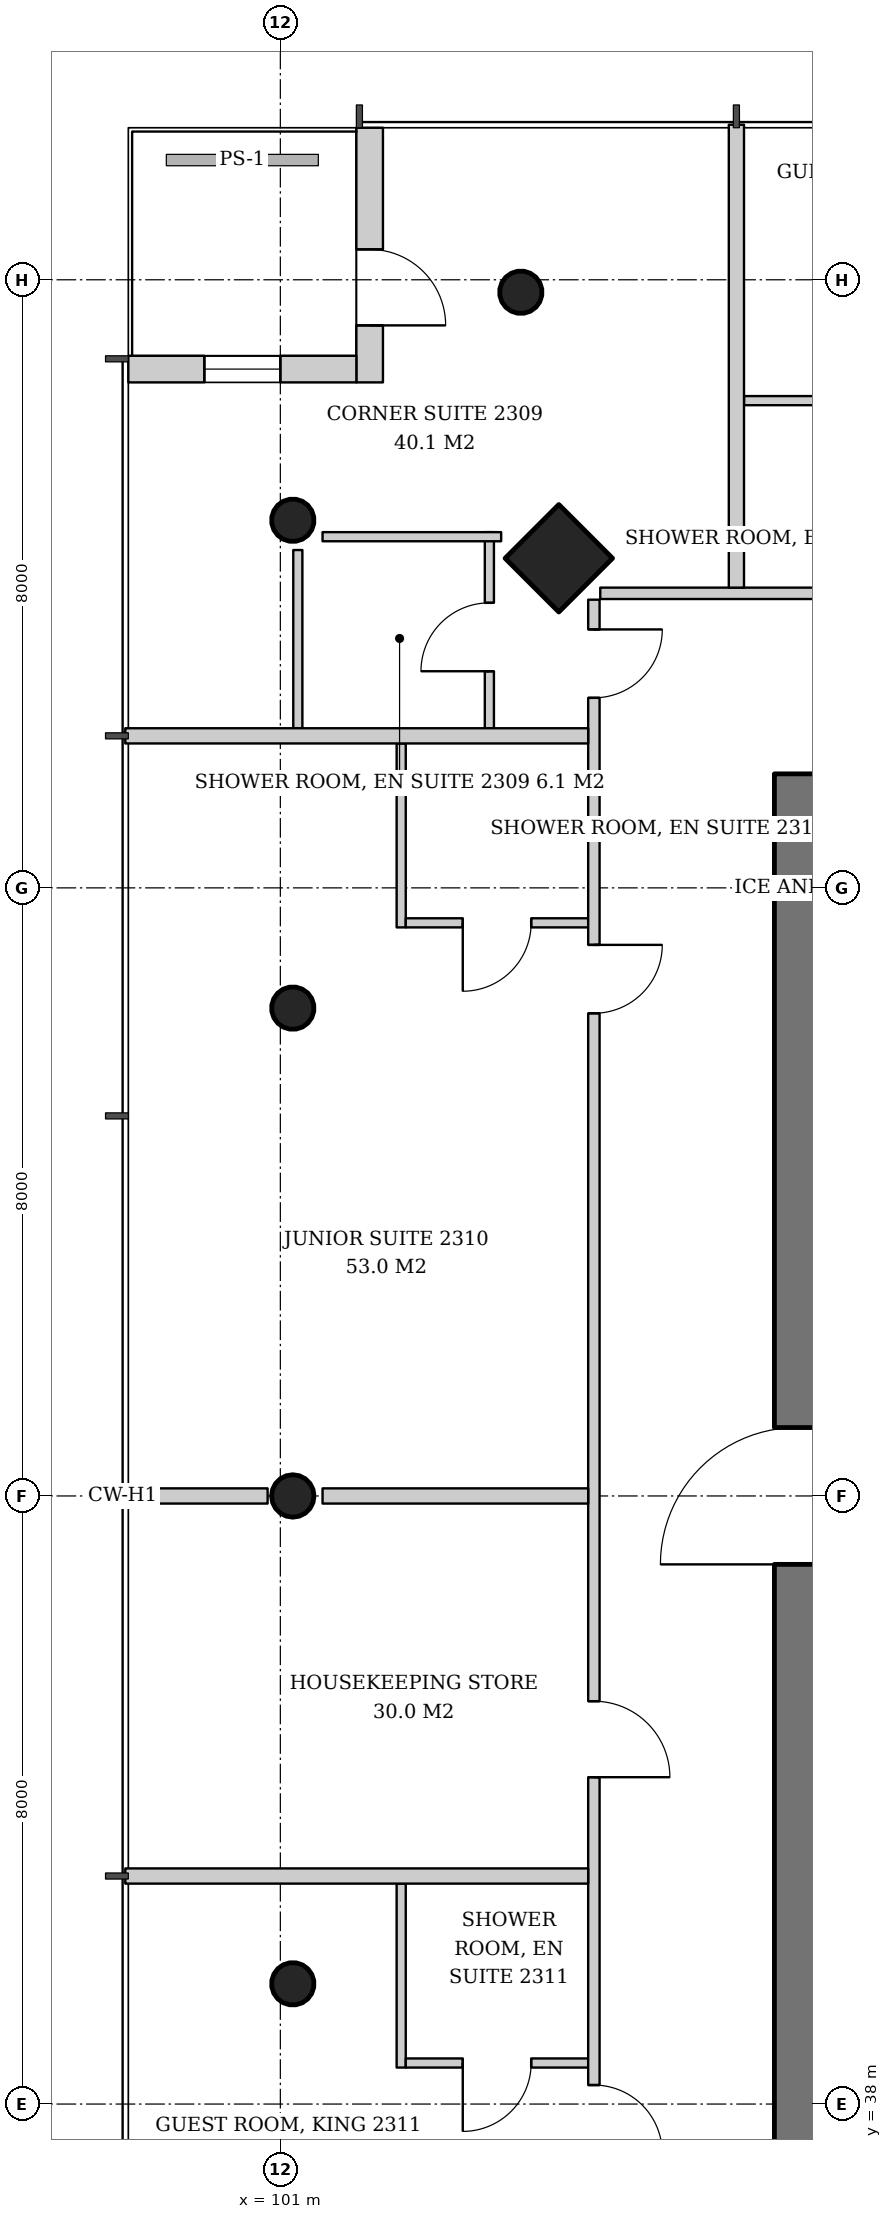
"""IFC4 building model, lengths in metres.
Left out: names, types, materials, properties, quantities, classifications, styles, units other than length and angle.
Written with IfcOpenShell. Run it as: python <this file> out.ifc"""

import sys

from ifc_helpers import new_model, si_unit, direction, frame, frame_2d, origin, origin_2d, place, context, subcontext, project, spatial, rectangle, hollow_circle, extrude, element, fill, save


model = new_model("IFC4")
c1 = context("Model", 3, precision=1e-05, world=origin(), true_north=direction((0.0, 1.0)))
c2 = subcontext(c1, "Body", "Model", "MODEL_VIEW")
j1 = project(units=[si_unit("LENGTHUNIT", "METRE"), si_unit("PLANEANGLEUNIT", "RADIAN")], contexts=[c1])
p1 = place(None, origin())
s1 = spatial("IfcSite", under=j1, at=p1, CompositionType="ELEMENT")
p2 = place(p1, origin())
s2 = spatial("IfcBuilding", under=s1, at=p2, CompositionType="ELEMENT")
p3 = place(p2, frame((0.0, 0.0, 93.2)))
s3 = spatial("IfcBuildingStorey", under=s2, at=p3, CompositionType="ELEMENT", Elevation=93.2)
p4 = place(p3, frame((104.612, 58.388, 0.0), z_axis=(0.043029647111, -0.043029647111, 0.998146732169), x_axis=(0.707106781187, 0.707106781187, 0.0)))
e1 = element("IfcColumn", 1, at=p4, inside=s3, PredefinedType="COLUMN", context=c2, shape_type="SweptSolid", body=[
    extrude(rectangle(XDim=1.0, YDim=1.0, at=origin_2d()), origin(), (0.0, 0.0, 1.0), 3.807),
])
for number, where, z_axis, x_axis in (
    (2, (104.112, 61.888, 0.0), (0.043, -0.043, 0.998), (0.707, 0.707, 0.0)),
    (3, (101.112, 58.888, 0.0), (0.043, -0.043, 0.998), (0.707, 0.707, 0.0)),
):
    element("IfcColumn", number, at=place(p3, frame(where, z_axis=z_axis, x_axis=x_axis)), inside=s3, PredefinedType="COLUMN", context=c2, shape_type="SweptSolid", body=[
        extrude(hollow_circle(Radius=0.28, WallThickness=0.02, at=origin_2d()), origin(), (0.0, 0.0, 1.0), 3.807),
    ])
p5 = place(p3, frame((101.112, 52.444, 0.0), z_axis=(0.043059584825, -0.021497706284, 0.998841188968), x_axis=(0.446680166538, 0.894693706707, 0.0)))
e4 = element("IfcColumn", 4, at=p5, inside=s3, PredefinedType="COLUMN", context=c2, shape_type="SweptSolid", body=[
    extrude(hollow_circle(Radius=0.28, WallThickness=0.02, at=origin_2d()), origin(), (0.0, 0.0, 1.0), 3.804),
])
p6 = place(p3, frame((101.112, 46.0, 0.0), z_axis=(0.043069538298, 0.0, 0.999072076915), x_axis=(0.0, 1.0, 0.0)))
e5 = element("IfcColumn", 5, at=p6, inside=s3, PredefinedType="COLUMN", context=c2, shape_type="SweptSolid", body=[
    extrude(hollow_circle(Radius=0.28, WallThickness=0.02, at=origin_2d()), origin(), (0.0, 0.0, 1.0), 3.803),
])
p7 = place(p3, frame((101.112, 39.556, 0.0), z_axis=(0.043059584825, 0.021497706284, 0.998841188968), x_axis=(-0.446680166538, 0.894693706707, 0.0)))
e6 = element("IfcColumn", 6, at=p7, inside=s3, PredefinedType="COLUMN", context=c2, shape_type="SweptSolid", body=[
    extrude(hollow_circle(Radius=0.28, WallThickness=0.02, at=origin_2d()), origin(), (0.0, 0.0, 1.0), 3.804),
])
p8 = place(p3, frame((107.5, 55.2, 0.0), z_axis=(0.0, 0.0, 1.0), x_axis=(1.0, 0.0, 0.0)))
e7 = element("IfcWall", 7, at=p8, inside=s3, PredefinedType="SHEAR", context=c2, shape_type="SweptSolid", body=[
    extrude(rectangle(XDim=19.0, YDim=0.6, at=frame_2d((9.5, 0.0))), origin(), (0.0, 0.0, 1.0), 3.8),
])
p9 = place(p8, frame((14.14, 0.0, 0.0)))
e8 = element("IfcOpeningElement", 8, at=p9, cuts=e7, PredefinedType="OPENING", context=c2, shape_type="SweptSolid", body=[
    extrude(rectangle(XDim=1.0, YDim=2.1, at=frame_2d((0.5, 1.05))), frame((0.0, 0.31, 0.0), z_axis=(0.0, -1.0, 0.0), x_axis=(1.0, 0.0, 0.0)), (0.0, 0.0, 1.0), 0.62),
])
p10 = place(p8, frame((1.675, 0.0, 0.0)))
e9 = element("IfcOpeningElement", 9, at=p10, cuts=e7, PredefinedType="OPENING", context=c2, shape_type="SweptSolid", body=[
    extrude(rectangle(XDim=1.0, YDim=2.1, at=frame_2d((0.5, 1.05))), frame((0.0, 0.31, 0.0), z_axis=(0.0, -1.0, 0.0), x_axis=(1.0, 0.0, 0.0)), (0.0, 0.0, 1.0), 0.62),
])
p11 = place(p8, frame((3.587, 0.0, 0.0)))
e10 = element("IfcOpeningElement", 10, at=p11, cuts=e7, PredefinedType="OPENING", context=c2, shape_type="SweptSolid", body=[
    extrude(rectangle(XDim=1.0, YDim=2.1, at=frame_2d((0.5, 1.05))), frame((0.0, 0.31, 0.0), z_axis=(0.0, -1.0, 0.0), x_axis=(1.0, 0.0, 0.0)), (0.0, 0.0, 1.0), 0.62),
])
p12 = place(p3, frame((107.8, 37.1, 0.0), z_axis=(0.0, 0.0, 1.0), x_axis=(0.0, 1.0, 0.0)))
e11 = element("IfcWall", 11, at=p12, inside=s3, PredefinedType="SHEAR", context=c2, shape_type="SweptSolid", body=[
    extrude(rectangle(XDim=17.8, YDim=0.6, at=frame_2d((8.9, 0.0))), origin(), (0.0, 0.0, 1.0), 3.8),
])
p13 = place(p12, frame((8.0, 0.0, 0.0)))
e12 = element("IfcOpeningElement", 12, at=p13, cuts=e11, PredefinedType="OPENING", context=c2, shape_type="SweptSolid", body=[
    extrude(rectangle(XDim=1.8, YDim=2.4, at=frame_2d((0.9, 1.2))), frame((0.0, 0.31, 0.0), z_axis=(0.0, -1.0, 0.0), x_axis=(1.0, 0.0, 0.0)), (0.0, 0.0, 1.0), 0.62),
])
p14 = place(p3, frame((102.175, 64.0, 0.0), z_axis=(0.0, 0.0, 1.0), x_axis=(0.0, -1.0, 0.0)))
e13 = element("IfcWall", 13, at=p14, inside=s3, PredefinedType="SOLIDWALL", context=c2, shape_type="SweptSolid", body=[
    extrude(rectangle(XDim=3.35, YDim=0.35, at=frame_2d((1.675, 0.0))), origin(), (0.0, 0.0, 1.0), 3.6),
])
p15 = place(p14, frame((1.6, 0.0, 0.0)))
e14 = element("IfcOpeningElement", 14, at=p15, cuts=e13, PredefinedType="OPENING", context=c2, shape_type="SweptSolid", body=[
    extrude(rectangle(XDim=1.0, YDim=2.4, at=frame_2d((0.5, 1.2))), frame((0.0, 0.185, 0.0), z_axis=(0.0, -1.0, 0.0), x_axis=(1.0, 0.0, 0.0)), (0.0, 0.0, 1.0), 0.37),
])
p16 = place(p3, frame((102.0, 60.825, 0.0), z_axis=(0.0, 0.0, 1.0), x_axis=(-1.0, 0.0, 0.0)))
e15 = element("IfcWall", 15, at=p16, inside=s3, PredefinedType="SOLIDWALL", context=c2, shape_type="SweptSolid", body=[
    extrude(rectangle(XDim=3.0, YDim=0.35, at=frame_2d((1.5, 0.0))), origin(), (0.0, 0.0, 1.0), 3.6),
])
p17 = place(p16, frame((1.0, 0.0, 0.9)))
e16 = element("IfcOpeningElement", 16, at=p17, cuts=e15, PredefinedType="OPENING", context=c2, shape_type="SweptSolid", body=[
    extrude(rectangle(XDim=1.0, YDim=2.4, at=frame_2d((0.5, 1.2))), frame((0.0, 0.185, 0.0), z_axis=(0.0, -1.0, 0.0), x_axis=(1.0, 0.0, 0.0)), (0.0, 0.0, 1.0), 0.37),
])
p18 = place(p3, frame((109.52, 60.41, 0.0), z_axis=(0.0, 0.0, 1.0), x_axis=(-1.0, 0.0, 0.0)))
e17 = element("IfcWall", 17, at=p18, inside=s3, PredefinedType="PARTITIONING", context=c2, shape_type="SweptSolid", body=[
    extrude(rectangle(XDim=2.42, YDim=0.12, at=frame_2d((1.21, 0.0))), origin(), (0.0, 0.0, 1.0), 3.0),
])
p19 = place(p3, frame((128.791, 57.875, 0.0), z_axis=(0.0, 0.0, 1.0), x_axis=(-1.0, 0.0, 0.0)))
e18 = element("IfcWall", 18, at=p19, inside=s3, PredefinedType="PARTITIONING", context=c2, shape_type="SweptSolid", body=[
    extrude(rectangle(XDim=23.583, YDim=0.15, at=frame_2d((11.791, 0.0))), origin(), (0.0, 0.0, 1.0), 2.9),
])
p20 = place(p19, frame((0.391, 0.0, 0.0)))
e19 = element("IfcOpeningElement", 19, at=p20, cuts=e18, PredefinedType="OPENING", context=c2, shape_type="SweptSolid", body=[
    extrude(rectangle(XDim=0.9, YDim=2.1, at=frame_2d((0.45, 1.05))), frame((0.0, 0.085, 0.0), z_axis=(0.0, -1.0, 0.0), x_axis=(1.0, 0.0, 0.0)), (0.0, 0.0, 1.0), 0.17),
])
p21 = place(p19, frame((8.141, 0.0, 0.0)))
e20 = element("IfcOpeningElement", 20, at=p21, cuts=e18, PredefinedType="OPENING", context=c2, shape_type="SweptSolid", body=[
    extrude(rectangle(XDim=0.9, YDim=2.1, at=frame_2d((0.45, 1.05))), frame((0.0, 0.085, 0.0), z_axis=(0.0, -1.0, 0.0), x_axis=(1.0, 0.0, 0.0)), (0.0, 0.0, 1.0), 0.17),
])
p22 = place(p19, frame((14.541, 0.0, 0.0)))
e21 = element("IfcOpeningElement", 21, at=p22, cuts=e18, PredefinedType="OPENING", context=c2, shape_type="SweptSolid", body=[
    extrude(rectangle(XDim=0.9, YDim=2.1, at=frame_2d((0.45, 1.05))), frame((0.0, 0.085, 0.0), z_axis=(0.0, -1.0, 0.0), x_axis=(1.0, 0.0, 0.0)), (0.0, 0.0, 1.0), 0.17),
])
p23 = place(p19, frame((18.141, 0.0, 0.0)))
e22 = element("IfcOpeningElement", 22, at=p23, cuts=e18, PredefinedType="OPENING", context=c2, shape_type="SweptSolid", body=[
    extrude(rectangle(XDim=0.9, YDim=2.1, at=frame_2d((0.45, 1.05))), frame((0.0, 0.085, 0.0), z_axis=(0.0, -1.0, 0.0), x_axis=(1.0, 0.0, 0.0)), (0.0, 0.0, 1.0), 0.17),
])
p24 = place(p3, frame((107.0, 57.95, 0.0), z_axis=(0.0, 0.0, 1.0), x_axis=(0.0, 1.0, 0.0)))
e23 = element("IfcWall", 23, at=p24, inside=s3, PredefinedType="PARTITIONING", context=c2, shape_type="SweptSolid", body=[
    extrude(rectangle(XDim=6.09, YDim=0.2, at=frame_2d((3.045, 0.0))), origin(), (0.0, 0.0, 1.0), 3.2),
])
p25 = place(p3, frame((103.75, 56.1, 0.0), z_axis=(0.0, 0.0, 1.0), x_axis=(0.0, 1.0, 0.0)))
e24 = element("IfcWall", 24, at=p25, inside=s3, PredefinedType="PARTITIONING", context=c2, shape_type="SweptSolid", body=[
    extrude(rectangle(XDim=2.58, YDim=0.12, at=frame_2d((1.29, 0.0))), origin(), (0.0, 0.0, 1.0), 3.2),
])
p26 = place(p25, frame((0.75, 0.0, 0.0)))
e25 = element("IfcOpeningElement", 25, at=p26, cuts=e24, PredefinedType="OPENING", context=c2, shape_type="SweptSolid", body=[
    extrude(rectangle(XDim=0.9, YDim=2.1, at=frame_2d((0.45, 1.05))), frame((0.0, 0.07, 0.0), z_axis=(0.0, -1.0, 0.0), x_axis=(1.0, 0.0, 0.0)), (0.0, 0.0, 1.0), 0.14),
])
p27 = place(p3, frame((101.23, 56.1, 0.0), z_axis=(0.0, 0.0, 1.0), x_axis=(0.0, 1.0, 0.0)))
e26 = element("IfcWall", 26, at=p27, inside=s3, PredefinedType="PARTITIONING", context=c2, shape_type="SweptSolid", body=[
    extrude(rectangle(XDim=2.344, YDim=0.12, at=frame_2d((1.172, 0.0))), origin(), (0.0, 0.0, 1.0), 3.2),
])
p28 = place(p3, frame((103.905, 58.62, 0.0), z_axis=(0.0, 0.0, 1.0), x_axis=(-1.0, 0.0, 0.0)))
e27 = element("IfcWall", 27, at=p28, inside=s3, PredefinedType="PARTITIONING", context=c2, shape_type="SweptSolid", body=[
    extrude(rectangle(XDim=2.35, YDim=0.12, at=frame_2d((1.175, 0.0))), origin(), (0.0, 0.0, 1.0), 3.2),
])
p29 = place(p3, frame((102.59, 55.9, 0.0), z_axis=(0.0, 0.0, 1.0), x_axis=(0.0, -1.0, 0.0)))
e28 = element("IfcWall", 28, at=p29, inside=s3, PredefinedType="PARTITIONING", context=c2, shape_type="SweptSolid", body=[
    extrude(rectangle(XDim=2.42, YDim=0.12, at=frame_2d((1.21, 0.0))), origin(), (0.0, 0.0, 1.0), 2.9),
])
p30 = place(p3, frame((105.05, 53.54, 0.0), z_axis=(0.0, 0.0, 1.0), x_axis=(-1.0, 0.0, 0.0)))
e29 = element("IfcWall", 29, at=p30, inside=s3, PredefinedType="PARTITIONING", context=c2, shape_type="SweptSolid", body=[
    extrude(rectangle(XDim=2.4, YDim=0.12, at=frame_2d((1.2, 0.0))), origin(), (0.0, 0.0, 1.0), 3.6),
])
p31 = place(p30, frame((0.75, 0.0, 0.0)))
e30 = element("IfcOpeningElement", 30, at=p31, cuts=e29, PredefinedType="OPENING", context=c2, shape_type="SweptSolid", body=[
    extrude(rectangle(XDim=0.9, YDim=2.1, at=frame_2d((0.45, 1.05))), frame((0.0, 0.07, 0.0), z_axis=(0.0, -1.0, 0.0), x_axis=(1.0, 0.0, 0.0)), (0.0, 0.0, 1.0), 0.14),
])
p32 = place(p3, frame((102.59, 40.9, 0.0), z_axis=(0.0, 0.0, 1.0), x_axis=(0.0, -1.0, 0.0)))
e31 = element("IfcWall", 31, at=p32, inside=s3, PredefinedType="PARTITIONING", context=c2, shape_type="SweptSolid", body=[
    extrude(rectangle(XDim=2.42, YDim=0.12, at=frame_2d((1.21, 0.0))), origin(), (0.0, 0.0, 1.0), 3.0),
])
p33 = place(p3, frame((105.05, 38.54, 0.0), z_axis=(0.0, 0.0, 1.0), x_axis=(-1.0, 0.0, 0.0)))
e32 = element("IfcWall", 32, at=p33, inside=s3, PredefinedType="PARTITIONING", context=c2, shape_type="SweptSolid", body=[
    extrude(rectangle(XDim=2.4, YDim=0.12, at=frame_2d((1.2, 0.0))), origin(), (0.0, 0.0, 1.0), 3.0),
])
p34 = place(p33, frame((0.75, 0.0, 0.0)))
e33 = element("IfcOpeningElement", 33, at=p34, cuts=e32, PredefinedType="OPENING", context=c2, shape_type="SweptSolid", body=[
    extrude(rectangle(XDim=0.9, YDim=2.1, at=frame_2d((0.45, 1.05))), frame((0.0, 0.07, 0.0), z_axis=(0.0, -1.0, 0.0), x_axis=(1.0, 0.0, 0.0)), (0.0, 0.0, 1.0), 0.14),
])
p35 = place(p3, frame((105.125, 57.791, 0.0), z_axis=(0.0, 0.0, 1.0), x_axis=(0.0, -1.0, 0.0)))
e34 = element("IfcWall", 34, at=p35, inside=s3, PredefinedType="PARTITIONING", context=c2, shape_type="SweptSolid", body=[
    extrude(rectangle(XDim=23.583, YDim=0.15, at=frame_2d((11.791, 0.0))), origin(), (0.0, 0.0, 1.0), 2.9),
])
p36 = place(p35, frame((0.391, 0.0, 0.0)))
e35 = element("IfcOpeningElement", 35, at=p36, cuts=e34, PredefinedType="OPENING", context=c2, shape_type="SweptSolid", body=[
    extrude(rectangle(XDim=0.9, YDim=2.1, at=frame_2d((0.45, 1.05))), frame((0.0, 0.085, 0.0), z_axis=(0.0, -1.0, 0.0), x_axis=(1.0, 0.0, 0.0)), (0.0, 0.0, 1.0), 0.17),
])
p37 = place(p35, frame((4.541, 0.0, 0.0)))
e36 = element("IfcOpeningElement", 36, at=p37, cuts=e34, PredefinedType="OPENING", context=c2, shape_type="SweptSolid", body=[
    extrude(rectangle(XDim=0.9, YDim=2.1, at=frame_2d((0.45, 1.05))), frame((0.0, 0.085, 0.0), z_axis=(0.0, -1.0, 0.0), x_axis=(1.0, 0.0, 0.0)), (0.0, 0.0, 1.0), 0.17),
])
p38 = place(p35, frame((14.491, 0.0, 0.0)))
e37 = element("IfcOpeningElement", 37, at=p38, cuts=e34, PredefinedType="OPENING", context=c2, shape_type="SweptSolid", body=[
    extrude(rectangle(XDim=1.0, YDim=2.1, at=frame_2d((0.5, 1.05))), frame((0.0, 0.085, 0.0), z_axis=(0.0, -1.0, 0.0), x_axis=(1.0, 0.0, 0.0)), (0.0, 0.0, 1.0), 0.17),
])
p39 = place(p35, frame((19.541, 0.0, 0.0)))
e38 = element("IfcOpeningElement", 38, at=p39, cuts=e34, PredefinedType="OPENING", context=c2, shape_type="SweptSolid", body=[
    extrude(rectangle(XDim=0.9, YDim=2.1, at=frame_2d((0.45, 1.05))), frame((0.0, 0.085, 0.0), z_axis=(0.0, -1.0, 0.0), x_axis=(1.0, 0.0, 0.0)), (0.0, 0.0, 1.0), 0.17),
])
p40 = place(p3, frame((105.05, 56.0, 0.0), z_axis=(0.0, 0.0, 1.0), x_axis=(-1.0, 0.0, 0.0)))
e39 = element("IfcWall", 39, at=p40, inside=s3, PredefinedType="PARTITIONING", context=c2, shape_type="SweptSolid", body=[
    extrude(rectangle(XDim=6.09, YDim=0.2, at=frame_2d((3.045, 0.0))), origin(), (0.0, 0.0, 1.0), 3.2),
])
p41 = place(p3, frame((105.05, 46.0, 0.0), z_axis=(0.0, 0.0, 1.0), x_axis=(-1.0, 0.0, 0.0)))
e40 = element("IfcWall", 40, at=p41, inside=s3, PredefinedType="PARTITIONING", context=c2, shape_type="SweptSolid", body=[
    extrude(rectangle(XDim=3.495, YDim=0.2, at=frame_2d((1.747, 0.0))), origin(), (0.0, 0.0, 1.0), 3.6),
])
p42 = place(p3, frame((100.833, 46.0, 0.0), z_axis=(0.0, 0.0, 1.0), x_axis=(-1.0, 0.0, 0.0)))
e41 = element("IfcWall", 41, at=p42, inside=s3, PredefinedType="PARTITIONING", context=c2, shape_type="SweptSolid", body=[
    extrude(rectangle(XDim=1.873, YDim=0.2, at=frame_2d((0.936, 0.0))), origin(), (0.0, 0.0, 1.0), 3.6),
])
p43 = place(p3, frame((105.05, 41.0, 0.0), z_axis=(0.0, 0.0, 1.0), x_axis=(-1.0, 0.0, 0.0)))
e42 = element("IfcWall", 42, at=p43, inside=s3, PredefinedType="PARTITIONING", context=c2, shape_type="SweptSolid", body=[
    extrude(rectangle(XDim=6.09, YDim=0.2, at=frame_2d((3.045, 0.0))), origin(), (0.0, 0.0, 1.0), 3.2),
])
p44 = place(p15, origin())
e43 = element("IfcDoor", 43, at=p44, inside=s3, OperationType="SINGLE_SWING_RIGHT", PredefinedType="DOOR", context=c2, shape_type="SweptSolid", body=[
    extrude(rectangle(XDim=1.0, YDim=2.4, at=frame_2d((0.5, 1.2))), frame((0.0, 0.025, 0.0), z_axis=(0.0, -1.0, 0.0), x_axis=(1.0, 0.0, 0.0)), (0.0, 0.0, 1.0), 0.05),
])
fill(e14, e43)
p45 = place(p17, origin())
e44 = element("IfcWindow", 44, at=p45, inside=s3, PartitioningType="SINGLE_PANEL", PredefinedType="WINDOW", context=c2, shape_type="SweptSolid", body=[
    extrude(rectangle(XDim=1.0, YDim=2.4, at=frame_2d((0.5, 1.2))), frame((0.0, 0.03, 0.0), z_axis=(0.0, -1.0, 0.0), x_axis=(1.0, 0.0, 0.0)), (0.0, 0.0, 1.0), 0.06),
])
fill(e16, e44)
p46 = place(p13, origin())
e45 = element("IfcDoor", 45, at=p46, inside=s3, OperationType="DOUBLE_DOOR_SINGLE_SWING", PredefinedType="DOOR", context=c2, shape_type="SweptSolid", body=[
    extrude(rectangle(XDim=1.8, YDim=2.4, at=frame_2d((0.9, 1.2))), frame((0.0, 0.025, 0.0), z_axis=(0.0, -1.0, 0.0), x_axis=(1.0, 0.0, 0.0)), (0.0, 0.0, 1.0), 0.05),
])
fill(e12, e45)
p47 = place(p26, origin())
e46 = element("IfcDoor", 46, at=p47, inside=s3, OperationType="SINGLE_SWING_LEFT", PredefinedType="DOOR", context=c2, shape_type="SweptSolid", body=[
    extrude(rectangle(XDim=0.9, YDim=2.1, at=frame_2d((0.45, 1.05))), frame((0.0, 0.025, 0.0), z_axis=(0.0, -1.0, 0.0), x_axis=(1.0, 0.0, 0.0)), (0.0, 0.0, 1.0), 0.05),
])
fill(e25, e46)
p48 = place(p31, origin())
e47 = element("IfcDoor", 47, at=p48, inside=s3, OperationType="SINGLE_SWING_RIGHT", PredefinedType="DOOR", context=c2, shape_type="SweptSolid", body=[
    extrude(rectangle(XDim=0.9, YDim=2.1, at=frame_2d((0.45, 1.05))), frame((0.0, 0.025, 0.0), z_axis=(0.0, -1.0, 0.0), x_axis=(1.0, 0.0, 0.0)), (0.0, 0.0, 1.0), 0.05),
])
fill(e30, e47)
p49 = place(p34, origin())
e48 = element("IfcDoor", 48, at=p49, inside=s3, OperationType="SINGLE_SWING_RIGHT", PredefinedType="DOOR", context=c2, shape_type="SweptSolid", body=[
    extrude(rectangle(XDim=0.9, YDim=2.1, at=frame_2d((0.45, 1.05))), frame((0.0, 0.025, 0.0), z_axis=(0.0, -1.0, 0.0), x_axis=(1.0, 0.0, 0.0)), (0.0, 0.0, 1.0), 0.05),
])
fill(e33, e48)
p50 = place(p36, origin())
e49 = element("IfcDoor", 49, at=p50, inside=s3, OperationType="SINGLE_SWING_LEFT", PredefinedType="DOOR", context=c2, shape_type="SweptSolid", body=[
    extrude(rectangle(XDim=0.9, YDim=2.1, at=frame_2d((0.45, 1.05))), frame((0.0, 0.025, 0.0), z_axis=(0.0, -1.0, 0.0), x_axis=(1.0, 0.0, 0.0)), (0.0, 0.0, 1.0), 0.05),
])
fill(e35, e49)
p51 = place(p37, origin())
e50 = element("IfcDoor", 50, at=p51, inside=s3, OperationType="SINGLE_SWING_LEFT", PredefinedType="DOOR", context=c2, shape_type="SweptSolid", body=[
    extrude(rectangle(XDim=0.9, YDim=2.1, at=frame_2d((0.45, 1.05))), frame((0.0, 0.025, 0.0), z_axis=(0.0, -1.0, 0.0), x_axis=(1.0, 0.0, 0.0)), (0.0, 0.0, 1.0), 0.05),
])
fill(e36, e50)
p52 = place(p38, origin())
e51 = element("IfcDoor", 51, at=p52, inside=s3, OperationType="SINGLE_SWING_RIGHT", PredefinedType="DOOR", context=c2, shape_type="SweptSolid", body=[
    extrude(rectangle(XDim=1.0, YDim=2.1, at=frame_2d((0.5, 1.05))), frame((0.0, 0.025, 0.0), z_axis=(0.0, -1.0, 0.0), x_axis=(1.0, 0.0, 0.0)), (0.0, 0.0, 1.0), 0.05),
])
fill(e37, e51)
p53 = place(p39, origin())
e52 = element("IfcDoor", 52, at=p53, inside=s3, OperationType="SINGLE_SWING_RIGHT", PredefinedType="DOOR", context=c2, shape_type="SweptSolid", body=[
    extrude(rectangle(XDim=0.9, YDim=2.1, at=frame_2d((0.45, 1.05))), frame((0.0, 0.025, 0.0), z_axis=(0.0, -1.0, 0.0), x_axis=(1.0, 0.0, 0.0)), (0.0, 0.0, 1.0), 0.05),
])
fill(e38, e52)
save(model, sys.argv[1])
